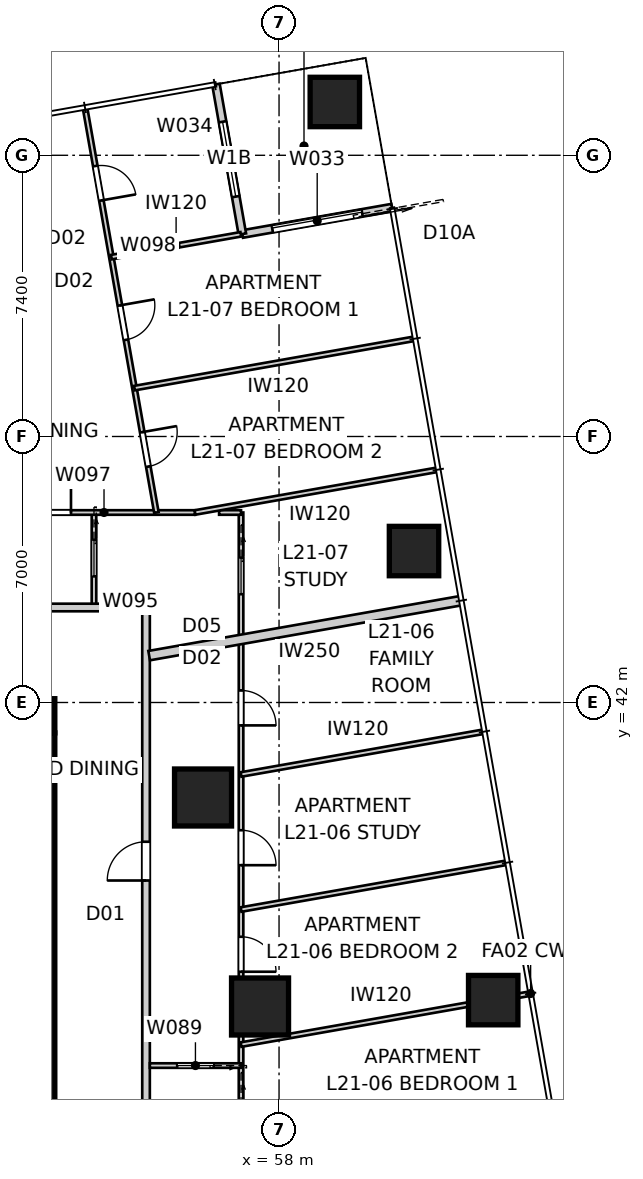
"""IFC4 building model, lengths in metres.
Left out: names, types, materials, properties, quantities, classifications, styles, units other than length and angle.
Written with IfcOpenShell. Run it as: python <this file> out.ifc"""

import sys

from ifc_helpers import new_model, si_unit, direction, frame, frame_2d, origin, origin_2d, place, context, subcontext, project, spatial, polyline, rectangle, outline, extrude, element, fill, save


model = new_model("IFC4")
c1 = context("Model", 3, precision=1e-05, world=origin(), true_north=direction((0.0, 1.0)))
c2 = subcontext(c1, "Body", "Model", "MODEL_VIEW")
j1 = project(units=[si_unit("LENGTHUNIT", "METRE"), si_unit("PLANEANGLEUNIT", "RADIAN")], contexts=[c1])
p1 = place(None, origin())
s1 = spatial("IfcSite", under=j1, at=p1, CompositionType="ELEMENT")
p2 = place(p1, origin())
s2 = spatial("IfcBuilding", under=s1, at=p2, CompositionType="ELEMENT")
p3 = place(p2, frame((0.0, 0.0, 79.4)))
s3 = spatial("IfcBuildingStorey", under=s2, at=p3, CompositionType="ELEMENT", Elevation=79.4)
p4 = place(p3, frame((51.65, 18.8, 0.0), z_axis=(0.0, 0.0, 1.0), x_axis=(0.0, 1.0, 0.0)))
e1 = element("IfcWall", 1, at=p4, inside=s3, PredefinedType="SHEAR", context=c2, shape_type="SweptSolid", body=[
    extrude(outline(polyline([(0.0, -0.45), (22.4, -0.45), (22.4, -0.025), (22.85, -0.025), (22.85, 0.025), (22.4, 0.025), (22.4, 0.45), (0.0, 0.45), (0.0, 0.025), (-0.45, 0.025), (-0.45, -0.025), (0.0, -0.025), (0.0, -0.45)])), origin(), (0.0, 0.0, 1.0), 3.4),
])
p5 = place(p4, frame((11.14, 0.0, 0.0)))
e2 = element("IfcOpeningElement", 2, at=p5, cuts=e1, PredefinedType="OPENING", context=c2, shape_type="SweptSolid", body=[
    extrude(rectangle(XDim=1.02, YDim=2.4, at=frame_2d((0.51, 1.2))), frame((0.0, 0.46, 0.0), z_axis=(0.0, -1.0, 0.0), x_axis=(1.0, 0.0, 0.0)), (0.0, 0.0, 1.0), 0.92),
])
p6 = place(p3, frame((51.65, 41.65, 0.0), z_axis=(0.0, 0.0, 1.0), x_axis=(1.0, 0.0, 0.0)))
e3 = element("IfcColumn", 3, at=p6, inside=s3, PredefinedType="COLUMN", context=c2, shape_type="SweptSolid", body=[
    extrude(rectangle(XDim=0.9, YDim=0.9, at=origin_2d()), origin(), (0.0, 0.0, 1.0), 3.4),
])
for number, where, z_axis, x_axis in (
    (4, (63.635, 34.167, -0.15), (0.0, 0.0, 1.0), (1.0, 0.0, 0.0)),
    (5, (61.552, 45.985, -0.15), (0.0, 0.0, 1.0), (1.0, 0.0, 0.0)),
    (6, (59.468, 57.803, -0.15), (0.0, 0.0, 1.0), (1.0, 0.0, 0.0)),
):
    element("IfcColumn", number, at=place(p3, frame(where, z_axis=z_axis, x_axis=x_axis)), inside=s3, PredefinedType="COLUMN", context=c2, shape_type="SweptSolid", body=[
        extrude(rectangle(XDim=1.3, YDim=1.3, at=origin_2d()), origin(), (0.0, 0.0, 1.0), 3.55),
    ])
for number, where, z_axis, x_axis in (
    (7, (57.5, 34.0, 0.0), (0.0, 0.0, 1.0), (1.0, 0.0, 0.0)),
    (8, (56.0, 39.5, 0.0), (0.0, 0.0, 1.0), (1.0, 0.0, 0.0)),
):
    element("IfcColumn", number, at=place(p3, frame(where, z_axis=z_axis, x_axis=x_axis)), inside=s3, PredefinedType="COLUMN", context=c2, shape_type="SweptSolid", body=[
        extrude(rectangle(XDim=1.5, YDim=1.5, at=origin_2d()), origin(), (0.0, 0.0, 1.0), 3.4),
    ])
p7 = place(p3, frame((60.974, 55.022, 0.0), z_axis=(0.0, 0.0, 1.0), x_axis=(-0.984808127031, -0.173646056486, 0.0)))
e9 = element("IfcWall", 9, at=p7, inside=s3, PredefinedType="SOLIDWALL", context=c2, shape_type="SweptSolid", body=[
    extrude(rectangle(XDim=4.0, YDim=0.2, at=frame_2d((2.0, 0.0))), origin(), (0.0, 0.0, 1.0), 3.25),
])
p8 = place(p7, frame((0.8, 0.0, 0.0)))
e10 = element("IfcOpeningElement", 10, at=p8, cuts=e9, PredefinedType="OPENING", context=c2, shape_type="SweptSolid", body=[
    extrude(rectangle(XDim=2.4, YDim=2.1, at=frame_2d((1.2, 1.05))), frame((0.0, 0.11, 0.0), z_axis=(0.0, -1.0, 0.0), x_axis=(1.0, 0.0, 0.0)), (0.0, 0.0, 1.0), 0.22),
])
p9 = place(p3, frame((57.034, 54.328, 0.0), z_axis=(0.0, 0.0, 1.0), x_axis=(-0.173646056486, 0.984808127031, 0.0)))
e11 = element("IfcWall", 11, at=p9, inside=s3, PredefinedType="SOLIDWALL", context=c2, shape_type="SweptSolid", body=[
    extrude(rectangle(XDim=4.0, YDim=0.2, at=frame_2d((2.0, 0.0))), origin(), (0.0, 0.0, 1.0), 3.25),
])
p10 = place(p9, frame((1.0, 0.0, 0.45)))
e12 = element("IfcOpeningElement", 12, at=p10, cuts=e11, PredefinedType="OPENING", context=c2, shape_type="SweptSolid", body=[
    extrude(rectangle(XDim=2.0, YDim=1.8, at=frame_2d((1.0, 0.9))), frame((0.0, 0.11, 0.0), z_axis=(0.0, -1.0, 0.0), x_axis=(1.0, 0.0, 0.0)), (0.0, 0.0, 1.0), 0.22),
])
p11 = place(p3, frame((54.5, 15.5, 0.0), z_axis=(0.0, 0.0, 1.0), x_axis=(0.0, 1.0, 0.0)))
e13 = element("IfcWall", 13, at=p11, inside=s3, PredefinedType="PARTITIONING", context=c2, shape_type="SweptSolid", body=[
    extrude(rectangle(XDim=29.0, YDim=0.2, at=frame_2d((14.5, 0.0))), origin(), (0.0, 0.0, 1.0), 3.25),
])
p12 = place(p11, frame((21.815, 0.0, 0.0)))
e14 = element("IfcOpeningElement", 14, at=p12, cuts=e13, PredefinedType="OPENING", context=c2, shape_type="SweptSolid", body=[
    extrude(rectangle(XDim=1.02, YDim=2.34, at=frame_2d((0.51, 1.17))), frame((0.0, 0.11, 0.0), z_axis=(0.0, -1.0, 0.0), x_axis=(1.0, 0.0, 0.0)), (0.0, 0.0, 1.0), 0.22),
])
p13 = place(p11, frame((2.855, 0.0, 0.0)))
e15 = element("IfcOpeningElement", 15, at=p13, cuts=e13, PredefinedType="OPENING", context=c2, shape_type="SweptSolid", body=[
    extrude(rectangle(XDim=1.02, YDim=2.1, at=frame_2d((0.51, 1.05))), frame((0.0, 0.11, 0.0), z_axis=(0.0, -1.0, 0.0), x_axis=(1.0, 0.0, 0.0)), (0.0, 0.0, 1.0), 0.22),
])
p14 = place(p3, frame((54.5, 44.5, 0.0), z_axis=(0.0, 0.0, 1.0), x_axis=(-1.0, 0.0, 0.0)))
e16 = element("IfcWall", 16, at=p14, inside=s3, PredefinedType="PARTITIONING", context=c2, shape_type="SweptSolid", body=[
    extrude(rectangle(XDim=29.0, YDim=0.2, at=frame_2d((14.5, 0.0))), origin(), (0.0, 0.0, 1.0), 3.25),
])
p15 = place(p14, frame((10.129, 0.0, 0.0)))
e17 = element("IfcOpeningElement", 17, at=p15, cuts=e16, PredefinedType="OPENING", context=c2, shape_type="SweptSolid", body=[
    extrude(rectangle(XDim=1.02, YDim=2.34, at=frame_2d((0.51, 1.17))), frame((0.0, 0.11, 0.0), z_axis=(0.0, -1.0, 0.0), x_axis=(1.0, 0.0, 0.0)), (0.0, 0.0, 1.0), 0.22),
])
p16 = place(p14, frame((3.065, 0.0, 0.0)))
e18 = element("IfcOpeningElement", 18, at=p16, cuts=e16, PredefinedType="OPENING", context=c2, shape_type="SweptSolid", body=[
    extrude(rectangle(XDim=1.02, YDim=2.1, at=frame_2d((0.51, 1.05))), frame((0.0, 0.11, 0.0), z_axis=(0.0, -1.0, 0.0), x_axis=(1.0, 0.0, 0.0)), (0.0, 0.0, 1.0), 0.22),
])
p17 = place(p3, frame((62.797, 44.682, 0.0), z_axis=(0.0, 0.0, 1.0), x_axis=(-0.984807121942, -0.173651756605, 0.0)))
e19 = element("IfcWall", 19, at=p17, inside=s3, PredefinedType="PARTITIONING", context=c2, shape_type="SweptSolid", body=[
    extrude(rectangle(XDim=8.341, YDim=0.25, at=frame_2d((4.171, 0.0))), origin(), (0.0, 0.0, 1.0), 3.25),
])
p18 = place(p3, frame((57.0, 47.0, 0.0), z_axis=(0.0, 0.0, 1.0), x_axis=(0.0, -1.0, 0.0)))
e20 = element("IfcWall", 20, at=p18, inside=s3, PredefinedType="PARTITIONING", context=c2, shape_type="SweptSolid", body=[
    extrude(rectangle(XDim=34.0, YDim=0.12, at=frame_2d((17.0, 0.0))), origin(), (0.0, 0.0, 1.0), 2.55),
])
p19 = place(p18, frame((8.361, 0.0, 0.0)))
e21 = element("IfcOpeningElement", 21, at=p19, cuts=e20, PredefinedType="OPENING", context=c2, shape_type="SweptSolid", body=[
    extrude(rectangle(XDim=0.92, YDim=2.34, at=frame_2d((0.46, 1.17))), frame((0.0, 0.07, 0.0), z_axis=(0.0, -1.0, 0.0), x_axis=(1.0, 0.0, 0.0)), (0.0, 0.0, 1.0), 0.14),
])
p20 = place(p18, frame((11.166, 0.0, 0.0)))
e22 = element("IfcOpeningElement", 22, at=p20, cuts=e20, PredefinedType="OPENING", context=c2, shape_type="SweptSolid", body=[
    extrude(rectangle(XDim=0.92, YDim=2.34, at=frame_2d((0.46, 1.17))), frame((0.0, 0.07, 0.0), z_axis=(0.0, -1.0, 0.0), x_axis=(1.0, 0.0, 0.0)), (0.0, 0.0, 1.0), 0.14),
])
p21 = place(p18, frame((4.683, 0.0, 0.0)))
e23 = element("IfcOpeningElement", 23, at=p21, cuts=e20, PredefinedType="OPENING", context=c2, shape_type="SweptSolid", body=[
    extrude(rectangle(XDim=0.92, YDim=2.34, at=frame_2d((0.46, 1.17))), frame((0.0, 0.07, 0.0), z_axis=(0.0, -1.0, 0.0), x_axis=(1.0, 0.0, 0.0)), (0.0, 0.0, 1.0), 0.14),
])
p22 = place(p18, frame((27.784, 0.0, 0.0)))
e24 = element("IfcOpeningElement", 24, at=p22, cuts=e20, PredefinedType="OPENING", context=c2, shape_type="SweptSolid", body=[
    extrude(rectangle(XDim=0.92, YDim=2.34, at=frame_2d((0.46, 1.17))), frame((0.0, 0.07, 0.0), z_axis=(0.0, -1.0, 0.0), x_axis=(1.0, 0.0, 0.0)), (0.0, 0.0, 1.0), 0.14),
])
p23 = place(p18, frame((31.939, 0.0, 0.0)))
e25 = element("IfcOpeningElement", 25, at=p23, cuts=e20, PredefinedType="OPENING", context=c2, shape_type="SweptSolid", body=[
    extrude(rectangle(XDim=0.92, YDim=2.34, at=frame_2d((0.46, 1.17))), frame((0.0, 0.07, 0.0), z_axis=(0.0, -1.0, 0.0), x_axis=(1.0, 0.0, 0.0)), (0.0, 0.0, 1.0), 0.14),
])
p24 = place(p18, frame((15.601, 0.0, 0.0)))
e26 = element("IfcOpeningElement", 26, at=p24, cuts=e20, PredefinedType="OPENING", context=c2, shape_type="SweptSolid", body=[
    extrude(rectangle(XDim=0.96, YDim=2.1, at=frame_2d((0.48, 1.05))), frame((0.0, 0.07, 0.0), z_axis=(0.0, -1.0, 0.0), x_axis=(1.0, 0.0, 0.0)), (0.0, 0.0, 1.0), 0.14),
])
p25 = place(p18, frame((18.21, 0.0, 0.0)))
e27 = element("IfcOpeningElement", 27, at=p25, cuts=e20, PredefinedType="OPENING", context=c2, shape_type="SweptSolid", body=[
    extrude(rectangle(XDim=0.96, YDim=2.1, at=frame_2d((0.48, 1.05))), frame((0.0, 0.07, 0.0), z_axis=(0.0, -1.0, 0.0), x_axis=(1.0, 0.0, 0.0)), (0.0, 0.0, 1.0), 0.14),
])
p26 = place(p18, frame((1.19, 0.0, 0.0)))
e28 = element("IfcOpeningElement", 28, at=p26, cuts=e20, PredefinedType="OPENING", context=c2, shape_type="SweptSolid", body=[
    extrude(rectangle(XDim=0.96, YDim=2.1, at=frame_2d((0.48, 1.05))), frame((0.0, 0.07, 0.0), z_axis=(0.0, -1.0, 0.0), x_axis=(1.0, 0.0, 0.0)), (0.0, 0.0, 1.0), 0.14),
])
p27 = place(p3, frame((57.0, 32.446, 0.0), z_axis=(0.0, 0.0, 1.0), x_axis=(-1.0, 0.0, 0.0)))
e29 = element("IfcWall", 29, at=p27, inside=s3, PredefinedType="PARTITIONING", context=c2, shape_type="SweptSolid", body=[
    extrude(rectangle(XDim=2.4, YDim=0.12, at=frame_2d((1.2, 0.0))), origin(), (0.0, 0.0, 1.0), 3.25),
])
p28 = place(p27, frame((0.72, 0.0, 0.0)))
e30 = element("IfcOpeningElement", 30, at=p28, cuts=e29, PredefinedType="OPENING", context=c2, shape_type="SweptSolid", body=[
    extrude(rectangle(XDim=0.96, YDim=2.1, at=frame_2d((0.48, 1.05))), frame((0.0, 0.07, 0.0), z_axis=(0.0, -1.0, 0.0), x_axis=(1.0, 0.0, 0.0)), (0.0, 0.0, 1.0), 0.14),
])
p29 = place(p3, frame((57.0, 32.998, 0.0), z_axis=(0.0, 0.0, 1.0), x_axis=(0.984808453088, 0.173644207293, 0.0)))
e31 = element("IfcWall", 31, at=p29, inside=s3, PredefinedType="PARTITIONING", context=c2, shape_type="SweptSolid", body=[
    extrude(rectangle(XDim=7.698, YDim=0.12, at=frame_2d((3.849, 0.0))), origin(), (0.0, 0.0, 1.0), 3.25),
])
p30 = place(p3, frame((57.0, 36.552, 0.0), z_axis=(0.0, 0.0, 1.0), x_axis=(0.984809234282, 0.173639776761, 0.0)))
e32 = element("IfcWall", 32, at=p30, inside=s3, PredefinedType="PARTITIONING", context=c2, shape_type="SweptSolid", body=[
    extrude(rectangle(XDim=7.081, YDim=0.12, at=frame_2d((3.541, 0.0))), origin(), (0.0, 0.0, 1.0), 3.25),
])
p31 = place(p3, frame((57.0, 40.105, 0.0), z_axis=(0.0, 0.0, 1.0), x_axis=(0.984809025774, 0.173640959323, 0.0)))
e33 = element("IfcWall", 33, at=p31, inside=s3, PredefinedType="PARTITIONING", context=c2, shape_type="SweptSolid", body=[
    extrude(rectangle(XDim=6.463, YDim=0.12, at=frame_2d((3.232, 0.0))), origin(), (0.0, 0.0, 1.0), 3.25),
])
p32 = place(p3, frame((53.13, 47.0, 0.0), z_axis=(0.0, 0.0, 1.0), x_axis=(0.0, -1.0, 0.0)))
e34 = element("IfcWall", 34, at=p32, inside=s3, PredefinedType="PARTITIONING", context=c2, shape_type="SweptSolid", body=[
    extrude(rectangle(XDim=2.4, YDim=0.12, at=frame_2d((1.2, 0.0))), origin(), (0.0, 0.0, 1.0), 3.25),
])
p33 = place(p32, frame((0.72, 0.0, 0.0)))
e35 = element("IfcOpeningElement", 35, at=p33, cuts=e34, PredefinedType="OPENING", context=c2, shape_type="SweptSolid", body=[
    extrude(rectangle(XDim=0.96, YDim=2.1, at=frame_2d((0.48, 1.05))), frame((0.0, 0.07, 0.0), z_axis=(0.0, -1.0, 0.0), x_axis=(1.0, 0.0, 0.0)), (0.0, 0.0, 1.0), 0.14),
])
p34 = place(p3, frame((51.0, 47.0, 0.0), z_axis=(0.0, 0.0, 1.0), x_axis=(1.0, 0.0, 0.0)))
e36 = element("IfcWall", 36, at=p34, inside=s3, PredefinedType="PARTITIONING", context=c2, shape_type="SweptSolid", body=[
    extrude(rectangle(XDim=4.789, YDim=0.12, at=frame_2d((2.395, 0.0))), origin(), (0.0, 0.0, 1.0), 2.638),
])
p35 = place(p34, frame((0.605, 0.0, 0.0)))
e37 = element("IfcOpeningElement", 37, at=p35, cuts=e36, PredefinedType="OPENING", context=c2, shape_type="SweptSolid", body=[
    extrude(rectangle(XDim=0.92, YDim=2.34, at=frame_2d((0.46, 1.17))), frame((0.0, 0.07, 0.0), z_axis=(0.0, -1.0, 0.0), x_axis=(1.0, 0.0, 0.0)), (0.0, 0.0, 1.0), 0.14),
])
p36 = place(p3, frame((52.9, 57.62, 0.0), z_axis=(0.0, 0.0, 1.0), x_axis=(0.173651010046, -0.984807253583, 0.0)))
e38 = element("IfcWall", 38, at=p36, inside=s3, PredefinedType="PARTITIONING", context=c2, shape_type="SweptSolid", body=[
    extrude(rectangle(XDim=10.783, YDim=0.12, at=frame_2d((5.392, 0.0))), origin(), (0.0, 0.0, 1.0), 3.25),
])
p37 = place(p36, frame((1.525, 0.0, 0.0)))
e39 = element("IfcOpeningElement", 39, at=p37, cuts=e38, PredefinedType="OPENING", context=c2, shape_type="SweptSolid", body=[
    extrude(rectangle(XDim=0.92, YDim=2.34, at=frame_2d((0.46, 1.17))), frame((0.0, 0.07, 0.0), z_axis=(0.0, -1.0, 0.0), x_axis=(1.0, 0.0, 0.0)), (0.0, 0.0, 1.0), 0.14),
])
p38 = place(p36, frame((5.25, 0.0, 0.0)))
e40 = element("IfcOpeningElement", 40, at=p38, cuts=e38, PredefinedType="OPENING", context=c2, shape_type="SweptSolid", body=[
    extrude(rectangle(XDim=0.92, YDim=2.34, at=frame_2d((0.46, 1.17))), frame((0.0, 0.07, 0.0), z_axis=(0.0, -1.0, 0.0), x_axis=(1.0, 0.0, 0.0)), (0.0, 0.0, 1.0), 0.14),
])
p39 = place(p36, frame((8.637, 0.0, 0.0)))
e41 = element("IfcOpeningElement", 41, at=p39, cuts=e38, PredefinedType="OPENING", context=c2, shape_type="SweptSolid", body=[
    extrude(rectangle(XDim=0.92, YDim=2.34, at=frame_2d((0.46, 1.17))), frame((0.0, 0.07, 0.0), z_axis=(0.0, -1.0, 0.0), x_axis=(1.0, 0.0, 0.0)), (0.0, 0.0, 1.0), 0.14),
])
p40 = place(p3, frame((61.542, 51.568, 0.0), z_axis=(0.0, 0.0, 1.0), x_axis=(-0.984807929323, -0.173647177755, 0.0)))
e42 = element("IfcWall", 42, at=p40, inside=s3, PredefinedType="PARTITIONING", context=c2, shape_type="SweptSolid", body=[
    extrude(rectangle(XDim=7.46, YDim=0.12, at=frame_2d((3.73, 0.0))), origin(), (0.0, 0.0, 1.0), 3.25),
])
p41 = place(p3, frame((53.588, 53.72, 0.0), z_axis=(0.0, 0.0, 1.0), x_axis=(0.984805572884, 0.173660541335, 0.0)))
e43 = element("IfcWall", 43, at=p41, inside=s3, PredefinedType="PARTITIONING", context=c2, shape_type="SweptSolid", body=[
    extrude(rectangle(XDim=3.46, YDim=0.12, at=frame_2d((1.73, 0.0))), origin(), (0.0, 0.0, 1.0), 3.25),
])
p42 = place(p3, frame((62.15, 48.122, 0.0), z_axis=(0.0, 0.0, 1.0), x_axis=(-0.984806762864, -0.173653792983, 0.0)))
e44 = element("IfcWall", 44, at=p42, inside=s3, PredefinedType="PARTITIONING", context=c2, shape_type="SweptSolid", body=[
    extrude(rectangle(XDim=6.459, YDim=0.12, at=frame_2d((3.229, 0.0))), origin(), (0.0, 0.0, 1.0), 2.638),
])
p43 = place(p3, frame((57.0, 47.0, 0.0), z_axis=(0.0, 0.0, 1.0), x_axis=(-1.0, 0.0, 0.0)))
e45 = element("IfcWall", 45, at=p43, inside=s3, PredefinedType="PARTITIONING", context=c2, shape_type="SweptSolid", body=[
    extrude(rectangle(XDim=0.578, YDim=0.12, at=frame_2d((0.289, 0.0))), origin(), (0.0, 0.0, 1.0), 3.25),
])
p44 = place(p8, origin())
e46 = element("IfcDoor", 46, at=p44, inside=s3, OperationType="SLIDING_TO_LEFT", PredefinedType="DOOR", context=c2, shape_type="SweptSolid", body=[
    extrude(rectangle(XDim=2.4, YDim=2.1, at=frame_2d((1.2, 1.05))), frame((0.0, 0.025, 0.0), z_axis=(0.0, -1.0, 0.0), x_axis=(1.0, 0.0, 0.0)), (0.0, 0.0, 1.0), 0.05),
])
fill(e10, e46)
p45 = place(p10, origin())
e47 = element("IfcWindow", 47, at=p45, inside=s3, PartitioningType="SINGLE_PANEL", PredefinedType="WINDOW", context=c2, shape_type="SweptSolid", body=[
    extrude(rectangle(XDim=2.0, YDim=1.8, at=frame_2d((1.0, 0.9))), frame((0.0, 0.03, 0.0), z_axis=(0.0, -1.0, 0.0), x_axis=(1.0, 0.0, 0.0)), (0.0, 0.0, 1.0), 0.06),
])
fill(e12, e47)
p46 = place(p12, origin())
e48 = element("IfcDoor", 48, at=p46, inside=s3, OperationType="SINGLE_SWING_LEFT", PredefinedType="DOOR", context=c2, shape_type="SweptSolid", body=[
    extrude(rectangle(XDim=1.02, YDim=2.34, at=frame_2d((0.51, 1.17))), frame((0.0, 0.025, 0.0), z_axis=(0.0, -1.0, 0.0), x_axis=(1.0, 0.0, 0.0)), (0.0, 0.0, 1.0), 0.05),
])
fill(e14, e48)
p47 = place(p19, origin())
e49 = element("IfcDoor", 49, at=p47, inside=s3, OperationType="SINGLE_SWING_RIGHT", PredefinedType="DOOR", context=c2, shape_type="SweptSolid", body=[
    extrude(rectangle(XDim=0.92, YDim=2.34, at=frame_2d((0.46, 1.17))), frame((0.0, 0.025, 0.0), z_axis=(0.0, -1.0, 0.0), x_axis=(1.0, 0.0, 0.0)), (0.0, 0.0, 1.0), 0.05),
])
fill(e21, e49)
p48 = place(p20, origin())
e50 = element("IfcDoor", 50, at=p48, inside=s3, OperationType="SINGLE_SWING_RIGHT", PredefinedType="DOOR", context=c2, shape_type="SweptSolid", body=[
    extrude(rectangle(XDim=0.92, YDim=2.34, at=frame_2d((0.46, 1.17))), frame((0.0, 0.025, 0.0), z_axis=(0.0, -1.0, 0.0), x_axis=(1.0, 0.0, 0.0)), (0.0, 0.0, 1.0), 0.05),
])
fill(e22, e50)
p49 = place(p21, origin())
e51 = element("IfcDoor", 51, at=p49, inside=s3, OperationType="SINGLE_SWING_RIGHT", PredefinedType="DOOR", context=c2, shape_type="SweptSolid", body=[
    extrude(rectangle(XDim=0.92, YDim=2.34, at=frame_2d((0.46, 1.17))), frame((0.0, 0.025, 0.0), z_axis=(0.0, -1.0, 0.0), x_axis=(1.0, 0.0, 0.0)), (0.0, 0.0, 1.0), 0.05),
])
fill(e23, e51)
p50 = place(p28, origin())
e52 = element("IfcDoor", 52, at=p50, inside=s3, OperationType="SLIDING_TO_LEFT", PredefinedType="DOOR", context=c2, shape_type="SweptSolid", body=[
    extrude(rectangle(XDim=0.96, YDim=2.1, at=frame_2d((0.48, 1.05))), frame((0.0, 0.025, 0.0), z_axis=(0.0, -1.0, 0.0), x_axis=(1.0, 0.0, 0.0)), (0.0, 0.0, 1.0), 0.05),
])
fill(e30, e52)
p51 = place(p33, origin())
e53 = element("IfcDoor", 53, at=p51, inside=s3, OperationType="SLIDING_TO_LEFT", PredefinedType="DOOR", context=c2, shape_type="SweptSolid", body=[
    extrude(rectangle(XDim=0.96, YDim=2.1, at=frame_2d((0.48, 1.05))), frame((0.0, 0.025, 0.0), z_axis=(0.0, -1.0, 0.0), x_axis=(1.0, 0.0, 0.0)), (0.0, 0.0, 1.0), 0.05),
])
fill(e35, e53)
p52 = place(p35, origin())
e54 = element("IfcDoor", 54, at=p52, inside=s3, OperationType="SINGLE_SWING_RIGHT", PredefinedType="DOOR", context=c2, shape_type="SweptSolid", body=[
    extrude(rectangle(XDim=0.92, YDim=2.34, at=frame_2d((0.46, 1.17))), frame((0.0, 0.025, 0.0), z_axis=(0.0, -1.0, 0.0), x_axis=(1.0, 0.0, 0.0)), (0.0, 0.0, 1.0), 0.05),
])
fill(e37, e54)
p53 = place(p26, origin())
e55 = element("IfcDoor", 55, at=p53, inside=s3, OperationType="SLIDING_TO_LEFT", PredefinedType="DOOR", context=c2, shape_type="SweptSolid", body=[
    extrude(rectangle(XDim=0.96, YDim=2.1, at=frame_2d((0.48, 1.05))), frame((0.0, 0.025, 0.0), z_axis=(0.0, -1.0, 0.0), x_axis=(1.0, 0.0, 0.0)), (0.0, 0.0, 1.0), 0.05),
])
fill(e28, e55)
p54 = place(p37, origin())
e56 = element("IfcDoor", 56, at=p54, inside=s3, OperationType="SINGLE_SWING_RIGHT", PredefinedType="DOOR", context=c2, shape_type="SweptSolid", body=[
    extrude(rectangle(XDim=0.92, YDim=2.34, at=frame_2d((0.46, 1.17))), frame((0.0, 0.025, 0.0), z_axis=(0.0, -1.0, 0.0), x_axis=(1.0, 0.0, 0.0)), (0.0, 0.0, 1.0), 0.05),
])
fill(e39, e56)
p55 = place(p38, origin())
e57 = element("IfcDoor", 57, at=p55, inside=s3, OperationType="SINGLE_SWING_LEFT", PredefinedType="DOOR", context=c2, shape_type="SweptSolid", body=[
    extrude(rectangle(XDim=0.92, YDim=2.34, at=frame_2d((0.46, 1.17))), frame((0.0, 0.025, 0.0), z_axis=(0.0, -1.0, 0.0), x_axis=(1.0, 0.0, 0.0)), (0.0, 0.0, 1.0), 0.05),
])
fill(e40, e57)
p56 = place(p39, origin())
e58 = element("IfcDoor", 58, at=p56, inside=s3, OperationType="SINGLE_SWING_LEFT", PredefinedType="DOOR", context=c2, shape_type="SweptSolid", body=[
    extrude(rectangle(XDim=0.92, YDim=2.34, at=frame_2d((0.46, 1.17))), frame((0.0, 0.025, 0.0), z_axis=(0.0, -1.0, 0.0), x_axis=(1.0, 0.0, 0.0)), (0.0, 0.0, 1.0), 0.05),
])
fill(e41, e58)
save(model, sys.argv[1])
